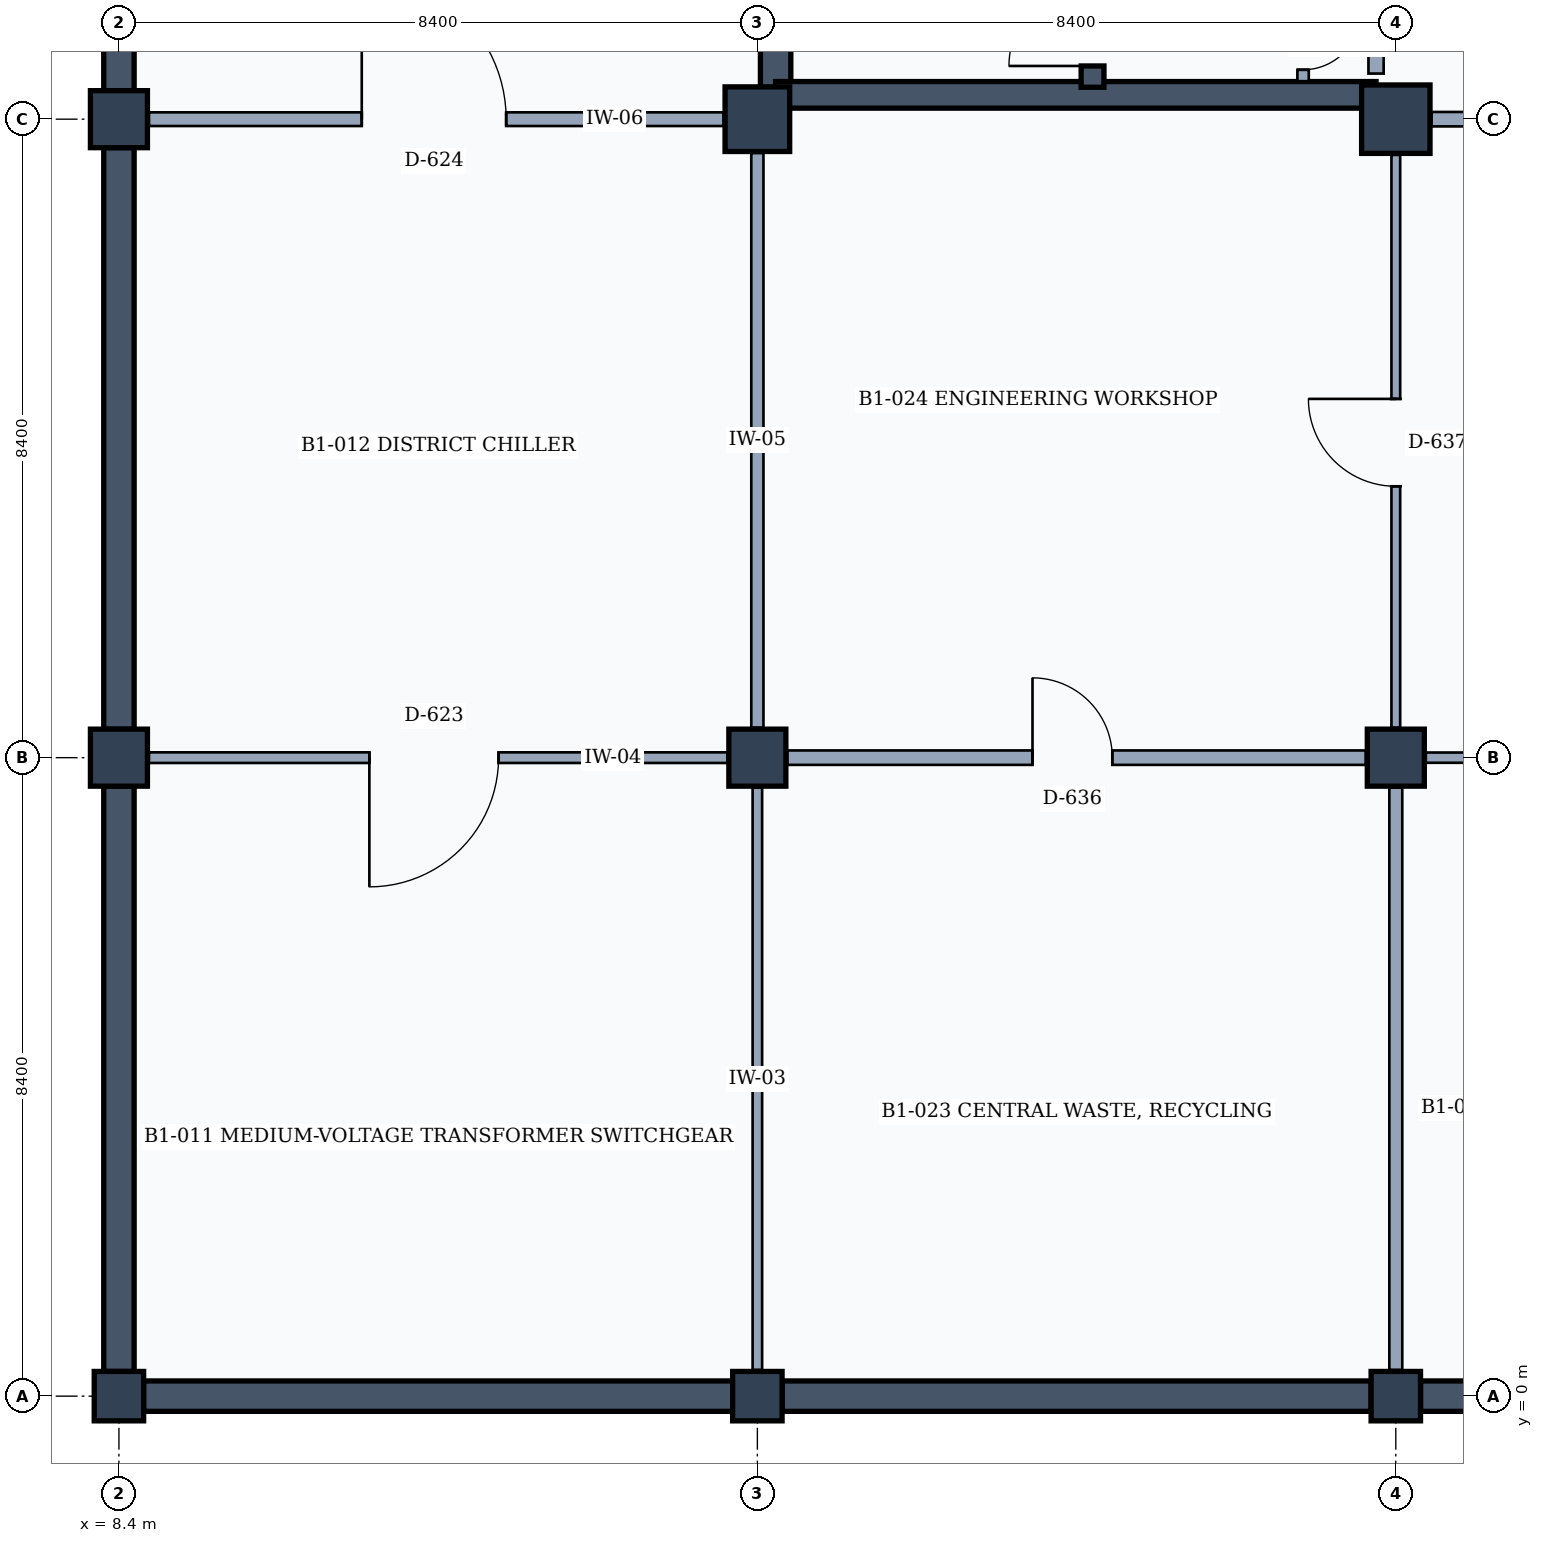
"""IFC4 building model, lengths in metres.
Left out: names, types, materials, properties, quantities, classifications, styles, units other than length and angle.
Written with IfcOpenShell. Run it as: python <this file> out.ifc"""

import sys

from ifc_helpers import new_model, si_unit, direction, frame, frame_2d, origin, origin_2d, place, context, subcontext, project, spatial, rectangle, extrude, element, fill, save


model = new_model("IFC4")
c1 = context("Model", 3, precision=1e-05, world=origin(), true_north=direction((0.0, 1.0)))
c2 = subcontext(c1, "Body", "Model", "MODEL_VIEW")
j1 = project(units=[si_unit("LENGTHUNIT", "METRE"), si_unit("PLANEANGLEUNIT", "RADIAN")], contexts=[c1])
p1 = place(None, origin())
s1 = spatial("IfcSite", under=j1, at=p1, CompositionType="ELEMENT")
p2 = place(p1, origin())
s2 = spatial("IfcBuilding", under=s1, at=p2, CompositionType="ELEMENT")
p3 = place(p2, frame((0.0, 0.0, -4.2)))
s3 = spatial("IfcBuildingStorey", under=s2, at=p3, CompositionType="ELEMENT", Elevation=-4.2)
p4 = place(p3, frame((8.4, 0.0, 0.0), z_axis=(0.0, 0.0, 1.0), x_axis=(1.0, 0.0, 0.0)))
e1 = element("IfcColumn", 1, at=p4, inside=s3, PredefinedType="COLUMN", context=c2, shape_type="SweptSolid", body=[
    extrude(rectangle(XDim=0.65, YDim=0.65, at=origin_2d()), origin(), (0.0, 0.0, 1.0), 4.2),
])
for number, where, z_axis, x_axis in (
    (2, (8.4, 8.4, 0.0), (0.0, 0.0, 1.0), (1.0, 0.0, 0.0)),
    (3, (8.4, 16.8, 0.0), (0.0, 0.0, 1.0), (1.0, 0.0, 0.0)),
):
    element("IfcColumn", number, at=place(p3, frame(where, z_axis=z_axis, x_axis=x_axis)), inside=s3, PredefinedType="COLUMN", context=c2, shape_type="SweptSolid", body=[
        extrude(rectangle(XDim=0.75, YDim=0.75, at=origin_2d()), origin(), (0.0, 0.0, 1.0), 4.2),
    ])
p5 = place(p3, frame((16.8, 0.0, 0.0), z_axis=(0.0, 0.0, 1.0), x_axis=(1.0, 0.0, 0.0)))
e4 = element("IfcColumn", 4, at=p5, inside=s3, PredefinedType="COLUMN", context=c2, shape_type="SweptSolid", body=[
    extrude(rectangle(XDim=0.65, YDim=0.65, at=origin_2d()), origin(), (0.0, 0.0, 1.0), 4.2),
])
p6 = place(p3, frame((16.8, 8.4, 0.0), z_axis=(0.0, 0.0, 1.0), x_axis=(1.0, 0.0, 0.0)))
e5 = element("IfcColumn", 5, at=p6, inside=s3, PredefinedType="COLUMN", context=c2, shape_type="SweptSolid", body=[
    extrude(rectangle(XDim=0.75, YDim=0.75, at=origin_2d()), origin(), (0.0, 0.0, 1.0), 4.2),
])
p7 = place(p3, frame((16.8, 16.8, 0.0), z_axis=(0.0, 0.0, 1.0), x_axis=(1.0, 0.0, 0.0)))
e6 = element("IfcColumn", 6, at=p7, inside=s3, PredefinedType="COLUMN", context=c2, shape_type="SweptSolid", body=[
    extrude(rectangle(XDim=0.85, YDim=0.85, at=origin_2d()), origin(), (0.0, 0.0, 1.0), 4.2),
])
p8 = place(p3, frame((25.2, 0.0, 0.0), z_axis=(0.0, 0.0, 1.0), x_axis=(1.0, 0.0, 0.0)))
e7 = element("IfcColumn", 7, at=p8, inside=s3, PredefinedType="COLUMN", context=c2, shape_type="SweptSolid", body=[
    extrude(rectangle(XDim=0.65, YDim=0.65, at=origin_2d()), origin(), (0.0, 0.0, 1.0), 4.2),
])
p9 = place(p3, frame((25.2, 8.4, 0.0), z_axis=(0.0, 0.0, 1.0), x_axis=(1.0, 0.0, 0.0)))
e8 = element("IfcColumn", 8, at=p9, inside=s3, PredefinedType="COLUMN", context=c2, shape_type="SweptSolid", body=[
    extrude(rectangle(XDim=0.75, YDim=0.75, at=origin_2d()), origin(), (0.0, 0.0, 1.0), 4.2),
])
p10 = place(p3, frame((25.2, 16.8, 0.0), z_axis=(0.0, 0.0, 1.0), x_axis=(1.0, 0.0, 0.0)))
e9 = element("IfcColumn", 9, at=p10, inside=s3, PredefinedType="COLUMN", context=c2, shape_type="SweptSolid", body=[
    extrude(rectangle(XDim=0.9, YDim=0.9, at=origin_2d()), origin(), (0.0, 0.0, 1.0), 4.2),
])
p11 = place(p3, frame((16.475, 0.0, 0.0), z_axis=(0.0, 0.0, 1.0), x_axis=(-1.0, 0.0, 0.0)))
e10 = element("IfcWall", 10, at=p11, inside=s3, PredefinedType="STANDARD", context=c2, shape_type="SweptSolid", body=[
    extrude(rectangle(XDim=7.75, YDim=0.4, at=frame_2d((3.875, 0.0))), origin(), (0.0, 0.0, 1.0), 3.88),
])
p12 = place(p3, frame((8.4, 0.325, 0.0), z_axis=(0.0, 0.0, 1.0), x_axis=(0.0, 1.0, 0.0)))
e11 = element("IfcWall", 11, at=p12, inside=s3, PredefinedType="STANDARD", context=c2, shape_type="SweptSolid", body=[
    extrude(rectangle(XDim=7.7, YDim=0.4, at=frame_2d((3.85, 0.0))), origin(), (0.0, 0.0, 1.0), 3.88),
])
p13 = place(p3, frame((8.4, 8.775, 0.0), z_axis=(0.0, 0.0, 1.0), x_axis=(0.0, 1.0, 0.0)))
e12 = element("IfcWall", 12, at=p13, inside=s3, PredefinedType="STANDARD", context=c2, shape_type="SweptSolid", body=[
    extrude(rectangle(XDim=7.65, YDim=0.4, at=frame_2d((3.825, 0.0))), origin(), (0.0, 0.0, 1.0), 3.88),
])
p14 = place(p3, frame((8.4, 17.175, 0.0), z_axis=(0.0, 0.0, 1.0), x_axis=(0.0, 1.0, 0.0)))
e13 = element("IfcWall", 13, at=p14, inside=s3, PredefinedType="STANDARD", context=c2, shape_type="SweptSolid", body=[
    extrude(rectangle(XDim=7.65, YDim=0.4, at=frame_2d((3.825, 0.0))), origin(), (0.0, 0.0, 1.0), 3.88),
])
for number, where, z_axis, x_axis in (
    (14, (24.875, 0.0, 0.0), (0.0, 0.0, 1.0), (-1.0, 0.0, 0.0)),
    (15, (33.275, 0.0, 0.0), (0.0, 0.0, 1.0), (-1.0, 0.0, 0.0)),
):
    element("IfcWall", number, at=place(p3, frame(where, z_axis=z_axis, x_axis=x_axis)), inside=s3, PredefinedType="STANDARD", context=c2, shape_type="SweptSolid", body=[
        extrude(rectangle(XDim=7.75, YDim=0.4, at=frame_2d((3.875, 0.0))), origin(), (0.0, 0.0, 1.0), 3.88),
    ])
p15 = place(p3, frame((17.04, 17.05, 0.0), z_axis=(0.0, 0.0, 1.0), x_axis=(0.0, 1.0, 0.0)))
e16 = element("IfcWall", 16, at=p15, inside=s3, PredefinedType="SHEAR", context=c2, shape_type="SweptSolid", body=[
    extrude(rectangle(XDim=7.94, YDim=0.4, at=frame_2d((3.97, 0.0))), origin(), (0.0, 0.0, 1.0), 3.9),
])
p16 = place(p3, frame((24.94, 24.6, 0.0), z_axis=(0.0, 0.0, 1.0), x_axis=(0.0, -1.0, 0.0)))
e17 = element("IfcWall", 17, at=p16, inside=s3, PredefinedType="PARTITIONING", context=c2, shape_type="SweptSolid", body=[
    extrude(rectangle(XDim=7.2, YDim=0.2, at=frame_2d((3.6, 0.0))), origin(), (0.0, 0.0, 1.0), 3.25),
])
p17 = place(p16, frame((3.55, 0.0, 0.0)))
e18 = element("IfcOpeningElement", 18, at=p17, cuts=e17, PredefinedType="OPENING", context=c2, shape_type="SweptSolid", body=[
    extrude(rectangle(XDim=1.1, YDim=2.15, at=frame_2d((0.55, 1.075))), frame((0.0, 0.11, 0.0), z_axis=(0.0, -1.0, 0.0), x_axis=(1.0, 0.0, 0.0)), (0.0, 0.0, 1.0), 0.22),
])
p18 = place(p3, frame((24.94, 17.12, 0.0), z_axis=(0.0, 0.0, 1.0), x_axis=(-1.0, 0.0, 0.0)))
e19 = element("IfcWall", 19, at=p18, inside=s3, PredefinedType="SHEAR", context=c2, shape_type="SweptSolid", body=[
    extrude(rectangle(XDim=7.9, YDim=0.35, at=frame_2d((3.95, 0.0))), origin(), (0.0, 0.0, 1.0), 3.9),
])
p19 = place(p3, frame((21.21, 17.22, 0.0), z_axis=(0.0, 0.0, 1.0), x_axis=(0.0, 1.0, 0.0)))
e20 = element("IfcWall", 20, at=p19, inside=s3, PredefinedType="SHEAR", context=c2, shape_type="SweptSolid", body=[
    extrude(rectangle(XDim=7.38, YDim=0.3, at=frame_2d((3.69, 0.0))), origin(), (0.0, 0.0, 1.0), 3.9),
])
p20 = place(p19, frame((0.28, 0.0, 0.0)))
e21 = element("IfcOpeningElement", 21, at=p20, cuts=e20, PredefinedType="OPENING", context=c2, shape_type="SweptSolid", body=[
    extrude(rectangle(XDim=1.1, YDim=2.15, at=frame_2d((0.55, 1.075))), frame((0.0, 0.16, 0.0), z_axis=(0.0, -1.0, 0.0), x_axis=(1.0, 0.0, 0.0)), (0.0, 0.0, 1.0), 0.32),
])
p21 = place(p3, frame((23.98, 18.36, 0.0), z_axis=(0.0, 0.0, 1.0), x_axis=(0.0, -1.0, 0.0)))
e22 = element("IfcWall", 22, at=p21, inside=s3, PredefinedType="PARTITIONING", context=c2, shape_type="SweptSolid", body=[
    extrude(rectangle(XDim=1.06, YDim=0.15, at=frame_2d((0.53, 0.0))), origin(), (0.0, 0.0, 1.0), 3.32),
])
p22 = place(p21, frame((0.16, 0.0, 0.0)))
e23 = element("IfcOpeningElement", 23, at=p22, cuts=e22, PredefinedType="OPENING", context=c2, shape_type="SweptSolid", body=[
    extrude(rectangle(XDim=0.75, YDim=2.05, at=frame_2d((0.375, 1.025))), frame((0.0, 0.085, 0.0), z_axis=(0.0, -1.0, 0.0), x_axis=(1.0, 0.0, 0.0)), (0.0, 0.0, 1.0), 0.17),
])
p23 = place(p3, frame((16.8, 0.345, 0.0), z_axis=(0.0, 0.0, 1.0), x_axis=(0.0, 1.0, 0.0)))
e24 = element("IfcWall", 24, at=p23, inside=s3, PredefinedType="PARTITIONING", context=c2, shape_type="SweptSolid", body=[
    extrude(rectangle(XDim=7.66, YDim=0.125, at=frame_2d((3.83, 0.0))), origin(), (0.0, 0.0, 1.0), 3.25),
])
p24 = place(p3, frame((8.795, 8.4, 0.0), z_axis=(0.0, 0.0, 1.0), x_axis=(1.0, 0.0, 0.0)))
e25 = element("IfcWall", 25, at=p24, inside=s3, PredefinedType="PARTITIONING", context=c2, shape_type="SweptSolid", body=[
    extrude(rectangle(XDim=7.61, YDim=0.14, at=frame_2d((3.805, 0.0))), origin(), (0.0, 0.0, 1.0), 3.05),
])
p25 = place(p24, frame((2.9, 0.0, 0.0)))
e26 = element("IfcOpeningElement", 26, at=p25, cuts=e25, PredefinedType="OPENING", context=c2, shape_type="SweptSolid", body=[
    extrude(rectangle(XDim=1.7, YDim=2.3, at=frame_2d((0.85, 1.15))), frame((0.0, 0.08, 0.0), z_axis=(0.0, -1.0, 0.0), x_axis=(1.0, 0.0, 0.0)), (0.0, 0.0, 1.0), 0.16),
])
p26 = place(p3, frame((16.8, 8.795, 0.0), z_axis=(0.0, 0.0, 1.0), x_axis=(0.0, 1.0, 0.0)))
e27 = element("IfcWall", 27, at=p26, inside=s3, PredefinedType="PARTITIONING", context=c2, shape_type="SweptSolid", body=[
    extrude(rectangle(XDim=7.56, YDim=0.16, at=frame_2d((3.78, 0.0))), origin(), (0.0, 0.0, 1.0), 3.25),
])
p27 = place(p3, frame((8.795, 16.8, 0.0), z_axis=(0.0, 0.0, 1.0), x_axis=(1.0, 0.0, 0.0)))
e28 = element("IfcWall", 28, at=p27, inside=s3, PredefinedType="PARTITIONING", context=c2, shape_type="SweptSolid", body=[
    extrude(rectangle(XDim=7.56, YDim=0.18, at=frame_2d((3.78, 0.0))), origin(), (0.0, 0.0, 1.0), 3.05),
])
p28 = place(p27, frame((2.8, 0.0, 0.0)))
e29 = element("IfcOpeningElement", 29, at=p28, cuts=e28, PredefinedType="OPENING", context=c2, shape_type="SweptSolid", body=[
    extrude(rectangle(XDim=1.9, YDim=2.4, at=frame_2d((0.95, 1.2))), frame((0.0, 0.1, 0.0), z_axis=(0.0, -1.0, 0.0), x_axis=(1.0, 0.0, 0.0)), (0.0, 0.0, 1.0), 0.2),
])
p29 = place(p3, frame((25.2, 0.345, 0.0), z_axis=(0.0, 0.0, 1.0), x_axis=(0.0, 1.0, 0.0)))
e30 = element("IfcWall", 30, at=p29, inside=s3, PredefinedType="PARTITIONING", context=c2, shape_type="SweptSolid", body=[
    extrude(rectangle(XDim=7.66, YDim=0.17, at=frame_2d((3.83, 0.0))), origin(), (0.0, 0.0, 1.0), 3.25),
])
p30 = place(p3, frame((17.195, 8.4, 0.0), z_axis=(0.0, 0.0, 1.0), x_axis=(1.0, 0.0, 0.0)))
e31 = element("IfcWall", 31, at=p30, inside=s3, PredefinedType="PARTITIONING", context=c2, shape_type="SweptSolid", body=[
    extrude(rectangle(XDim=7.61, YDim=0.19, at=frame_2d((3.805, 0.0))), origin(), (0.0, 0.0, 1.0), 3.05),
])
p31 = place(p30, frame((3.225, 0.0, 0.0)))
e32 = element("IfcOpeningElement", 32, at=p31, cuts=e31, PredefinedType="OPENING", context=c2, shape_type="SweptSolid", body=[
    extrude(rectangle(XDim=1.05, YDim=2.2, at=frame_2d((0.525, 1.1))), frame((0.0, 0.105, 0.0), z_axis=(0.0, -1.0, 0.0), x_axis=(1.0, 0.0, 0.0)), (0.0, 0.0, 1.0), 0.21),
])
p32 = place(p3, frame((25.2, 8.795, 0.0), z_axis=(0.0, 0.0, 1.0), x_axis=(0.0, 1.0, 0.0)))
e33 = element("IfcWall", 33, at=p32, inside=s3, PredefinedType="PARTITIONING", context=c2, shape_type="SweptSolid", body=[
    extrude(rectangle(XDim=7.535, YDim=0.115, at=frame_2d((3.768, 0.0))), origin(), (0.0, 0.0, 1.0), 3.25),
])
p33 = place(p32, frame((3.175, 0.0, 0.0)))
e34 = element("IfcOpeningElement", 34, at=p33, cuts=e33, PredefinedType="OPENING", context=c2, shape_type="SweptSolid", body=[
    extrude(rectangle(XDim=1.15, YDim=2.25, at=frame_2d((0.575, 1.125))), frame((0.0, 0.067, 0.0), z_axis=(0.0, -1.0, 0.0), x_axis=(1.0, 0.0, 0.0)), (0.0, 0.0, 1.0), 0.135),
])
p34 = place(p3, frame((25.595, 8.4, 0.0), z_axis=(0.0, 0.0, 1.0), x_axis=(1.0, 0.0, 0.0)))
e35 = element("IfcWall", 35, at=p34, inside=s3, PredefinedType="PARTITIONING", context=c2, shape_type="SweptSolid", body=[
    extrude(rectangle(XDim=7.61, YDim=0.135, at=frame_2d((3.805, 0.0))), origin(), (0.0, 0.0, 1.0), 3.05),
])
p35 = place(p34, frame((3.275, 0.0, 0.0)))
e36 = element("IfcOpeningElement", 36, at=p35, cuts=e35, PredefinedType="OPENING", context=c2, shape_type="SweptSolid", body=[
    extrude(rectangle(XDim=0.95, YDim=2.15, at=frame_2d((0.475, 1.075))), frame((0.0, 0.077, 0.0), z_axis=(0.0, -1.0, 0.0), x_axis=(1.0, 0.0, 0.0)), (0.0, 0.0, 1.0), 0.155),
])
p36 = place(p3, frame((25.67, 16.8, 0.0), z_axis=(0.0, 0.0, 1.0), x_axis=(1.0, 0.0, 0.0)))
e37 = element("IfcWall", 37, at=p36, inside=s3, PredefinedType="PARTITIONING", context=c2, shape_type="SweptSolid", body=[
    extrude(rectangle(XDim=7.535, YDim=0.19, at=frame_2d((3.768, 0.0))), origin(), (0.0, 0.0, 1.0), 3.05),
])
p37 = place(p36, frame((2.85, 0.0, 0.0)))
e38 = element("IfcOpeningElement", 38, at=p37, cuts=e37, PredefinedType="OPENING", context=c2, shape_type="SweptSolid", body=[
    extrude(rectangle(XDim=1.8, YDim=2.3, at=frame_2d((0.9, 1.15))), frame((0.0, 0.105, 0.0), z_axis=(0.0, -1.0, 0.0), x_axis=(1.0, 0.0, 0.0)), (0.0, 0.0, 1.0), 0.21),
])
p38 = place(p20, origin())
e39 = element("IfcDoor", 39, at=p38, inside=s3, OperationType="SINGLE_SWING_LEFT", PredefinedType="DOOR", context=c2, shape_type="SweptSolid", body=[
    extrude(rectangle(XDim=1.1, YDim=2.15, at=frame_2d((0.55, 1.075))), frame((0.0, 0.025, 0.0), z_axis=(0.0, -1.0, 0.0), x_axis=(1.0, 0.0, 0.0)), (0.0, 0.0, 1.0), 0.05),
])
fill(e21, e39)
p39 = place(p22, origin())
e40 = element("IfcDoor", 40, at=p39, inside=s3, OperationType="SINGLE_SWING_LEFT", PredefinedType="TRAPDOOR", context=c2, shape_type="SweptSolid", body=[
    extrude(rectangle(XDim=0.75, YDim=2.05, at=frame_2d((0.375, 1.025))), frame((0.0, 0.025, 0.0), z_axis=(0.0, -1.0, 0.0), x_axis=(1.0, 0.0, 0.0)), (0.0, 0.0, 1.0), 0.05),
])
fill(e23, e40)
p40 = place(p25, frame((1.7, 0.0, 0.0), z_axis=(0.0, 0.0, 1.0), x_axis=(-1.0, 0.0, 0.0)))
e41 = element("IfcDoor", 41, at=p40, inside=s3, OperationType="SINGLE_SWING_RIGHT", PredefinedType="DOOR", context=c2, shape_type="SweptSolid", body=[
    extrude(rectangle(XDim=1.7, YDim=2.3, at=frame_2d((0.85, 1.15))), frame((0.0, 0.025, 0.0), z_axis=(0.0, -1.0, 0.0), x_axis=(1.0, 0.0, 0.0)), (0.0, 0.0, 1.0), 0.05),
])
fill(e26, e41)
p41 = place(p28, origin())
e42 = element("IfcDoor", 42, at=p41, inside=s3, OperationType="SINGLE_SWING_LEFT", PredefinedType="DOOR", context=c2, shape_type="SweptSolid", body=[
    extrude(rectangle(XDim=1.9, YDim=2.4, at=frame_2d((0.95, 1.2))), frame((0.0, 0.025, 0.0), z_axis=(0.0, -1.0, 0.0), x_axis=(1.0, 0.0, 0.0)), (0.0, 0.0, 1.0), 0.05),
])
fill(e29, e42)
p42 = place(p31, origin())
e43 = element("IfcDoor", 43, at=p42, inside=s3, OperationType="SINGLE_SWING_LEFT", PredefinedType="DOOR", context=c2, shape_type="SweptSolid", body=[
    extrude(rectangle(XDim=1.05, YDim=2.2, at=frame_2d((0.525, 1.1))), frame((0.0, 0.025, 0.0), z_axis=(0.0, -1.0, 0.0), x_axis=(1.0, 0.0, 0.0)), (0.0, 0.0, 1.0), 0.05),
])
fill(e32, e43)
p43 = place(p33, origin())
e44 = element("IfcDoor", 44, at=p43, inside=s3, OperationType="SINGLE_SWING_RIGHT", PredefinedType="DOOR", context=c2, shape_type="SweptSolid", body=[
    extrude(rectangle(XDim=1.15, YDim=2.25, at=frame_2d((0.575, 1.125))), frame((0.0, 0.025, 0.0), z_axis=(0.0, -1.0, 0.0), x_axis=(1.0, 0.0, 0.0)), (0.0, 0.0, 1.0), 0.05),
])
fill(e34, e44)
save(model, sys.argv[1])
